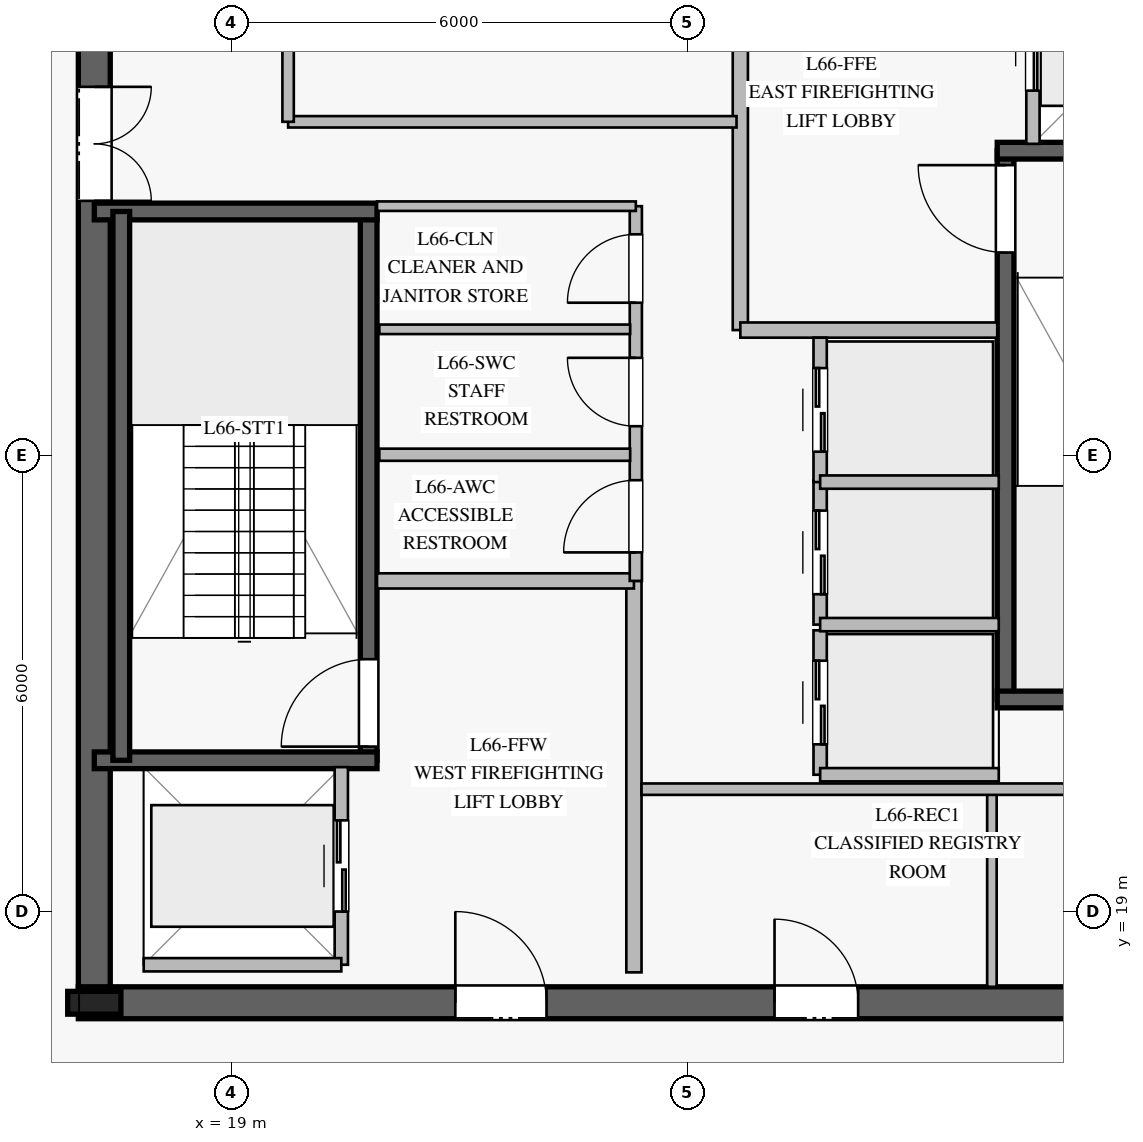
"""IFC4 building model, lengths in metres.
Left out: names, types, materials, properties, quantities, classifications, styles, units other than length and angle.
Written with IfcOpenShell. Run it as: python <this file> out.ifc"""

import sys

from ifc_helpers import new_model, si_unit, direction, frame, frame_2d, origin, origin_2d, place, context, subcontext, project, spatial, rectangle, i_section, extrude, element, fill, save


model = new_model("IFC4")
c1 = context("Model", 3, precision=1e-05, world=origin(), true_north=direction((0.0, 1.0)))
c2 = subcontext(c1, "Body", "Model", "MODEL_VIEW")
j1 = project(units=[si_unit("LENGTHUNIT", "METRE"), si_unit("PLANEANGLEUNIT", "RADIAN")], contexts=[c1])
p1 = place(None, origin())
s1 = spatial("IfcSite", under=j1, at=p1, CompositionType="ELEMENT")
p2 = place(p1, origin())
s2 = spatial("IfcBuilding", under=s1, at=p2, CompositionType="ELEMENT")
p3 = place(p2, frame((0.0, 0.0, 274.2)))
s3 = spatial("IfcBuildingStorey", under=s2, at=p3, CompositionType="ELEMENT", Elevation=274.2)
p4 = place(p3, frame((16.99, 17.8, 0.0), z_axis=(0.0, 0.0, 1.0), x_axis=(1.0, 0.0, 0.0)))
e1 = element("IfcWall", 1, at=p4, inside=s3, PredefinedType="SHEAR", context=c2, shape_type="SweptSolid", body=[
    extrude(rectangle(XDim=16.02, YDim=0.42, at=frame_2d((8.01, 0.0))), origin(), (0.0, 0.0, 1.0), 3.78),
])
p5 = place(p4, frame((4.96, 0.0, 0.0)))
e2 = element("IfcOpeningElement", 2, at=p5, cuts=e1, PredefinedType="OPENING", context=c2, shape_type="SweptSolid", body=[
    extrude(rectangle(XDim=1.2, YDim=2.25, at=frame_2d((0.6, 1.125))), frame((0.0, 0.22, 0.0), z_axis=(0.0, -1.0, 0.0), x_axis=(1.0, 0.0, 0.0)), (0.0, 0.0, 1.0), 0.44),
])
p6 = place(p4, frame((13.91, 0.0, 0.0)))
e3 = element("IfcOpeningElement", 3, at=p6, cuts=e1, PredefinedType="OPENING", context=c2, shape_type="SweptSolid", body=[
    extrude(rectangle(XDim=0.9, YDim=2.1, at=frame_2d((0.45, 1.05))), frame((0.0, 0.22, 0.0), z_axis=(0.0, -1.0, 0.0), x_axis=(1.0, 0.0, 0.0)), (0.0, 0.0, 1.0), 0.44),
])
p7 = place(p4, frame((9.16, 0.0, 0.0)))
e4 = element("IfcOpeningElement", 4, at=p7, cuts=e1, PredefinedType="OPENING", context=c2, shape_type="SweptSolid", body=[
    extrude(rectangle(XDim=1.1, YDim=2.2, at=frame_2d((0.55, 1.1))), frame((0.0, 0.22, 0.0), z_axis=(0.0, -1.0, 0.0), x_axis=(1.0, 0.0, 0.0)), (0.0, 0.0, 1.0), 0.44),
])
p8 = place(p3, frame((17.2, 31.99, 0.0), z_axis=(0.0, 0.0, 1.0), x_axis=(0.0, -1.0, 0.0)))
e5 = element("IfcWall", 5, at=p8, inside=s3, PredefinedType="SHEAR", context=c2, shape_type="SweptSolid", body=[
    extrude(rectangle(XDim=13.98, YDim=0.42, at=frame_2d((6.99, 0.0))), origin(), (0.0, 0.0, 1.0), 3.78),
])
p9 = place(p8, frame((2.14, 0.0, 0.0)))
e6 = element("IfcOpeningElement", 6, at=p9, cuts=e5, PredefinedType="OPENING", context=c2, shape_type="SweptSolid", body=[
    extrude(rectangle(XDim=1.5, YDim=2.2, at=frame_2d((0.75, 1.1))), frame((0.0, 0.22, 0.0), z_axis=(0.0, -1.0, 0.0), x_axis=(1.0, 0.0, 0.0)), (0.0, 0.0, 1.0), 0.44),
])
p10 = place(p3, frame((17.2, 17.8, 0.0), z_axis=(0.0, 0.0, 1.0), x_axis=(1.0, 0.0, 0.0)))
e7 = element("IfcColumn", 7, at=p10, inside=s3, PredefinedType="COLUMN", context=c2, shape_type="SweptSolid", body=[
    extrude(i_section(OverallWidth=0.3, OverallDepth=0.7, WebThickness=0.017, FlangeThickness=0.032, at=origin_2d()), origin(), (0.0, 0.0, 1.0), 4.0),
])
p11 = place(p3, frame((20.81, 20.99, 0.0), z_axis=(0.0, 0.0, 1.0), x_axis=(0.0, 1.0, 0.0)))
e8 = element("IfcWall", 8, at=p11, inside=s3, PredefinedType="SOLIDWALL", context=c2, shape_type="SweptSolid", body=[
    extrude(rectangle(XDim=7.22, YDim=0.22, at=frame_2d((3.61, 0.0))), origin(), (0.0, 0.0, 1.0), 3.78),
])
p12 = place(p11, frame((0.18, 0.0, 0.0)))
e9 = element("IfcOpeningElement", 9, at=p12, cuts=e8, PredefinedType="OPENING", context=c2, shape_type="SweptSolid", body=[
    extrude(rectangle(XDim=1.15, YDim=2.2, at=frame_2d((0.575, 1.1))), frame((0.0, 0.12, 0.0), z_axis=(0.0, -1.0, 0.0), x_axis=(1.0, 0.0, 0.0)), (0.0, 0.0, 1.0), 0.24),
])
for number, where, z_axis, x_axis in (
    (10, (17.2, 20.99, 0.0), (0.0, 0.0, 1.0), (1.0, 0.0, 0.0)),
    (11, (17.2, 28.21, 0.0), (0.0, 0.0, 1.0), (1.0, 0.0, 0.0)),
):
    element("IfcWall", number, at=place(p3, frame(where, z_axis=z_axis, x_axis=x_axis)), inside=s3, PredefinedType="SOLIDWALL", context=c2, shape_type="SweptSolid", body=[
        extrude(rectangle(XDim=3.72, YDim=0.22, at=frame_2d((1.86, 0.0))), origin(), (0.0, 0.0, 1.0), 3.78),
    ])
p13 = place(p3, frame((17.555, 28.21, 0.0), z_axis=(0.0, 0.0, 1.0), x_axis=(0.0, -1.0, 0.0)))
e12 = element("IfcWall", 12, at=p13, inside=s3, PredefinedType="SOLIDWALL", context=c2, shape_type="SweptSolid", body=[
    extrude(rectangle(XDim=7.22, YDim=0.22, at=frame_2d((3.61, 0.0))), origin(), (0.0, 0.0, 1.0), 3.78),
])
p14 = place(p3, frame((29.19, 21.79, 0.0), z_axis=(0.0, 0.0, 1.0), x_axis=(0.0, 1.0, 0.0)))
e13 = element("IfcWall", 13, at=p14, inside=s3, PredefinedType="SOLIDWALL", context=c2, shape_type="SweptSolid", body=[
    extrude(rectangle(XDim=7.22, YDim=0.22, at=frame_2d((3.61, 0.0))), origin(), (0.0, 0.0, 1.0), 3.78),
])
p15 = place(p14, frame((5.88, 0.0, 0.0)))
e14 = element("IfcOpeningElement", 14, at=p15, cuts=e13, PredefinedType="OPENING", context=c2, shape_type="SweptSolid", body=[
    extrude(rectangle(XDim=1.15, YDim=2.2, at=frame_2d((0.575, 1.1))), frame((0.0, 0.12, 0.0), z_axis=(0.0, -1.0, 0.0), x_axis=(1.0, 0.0, 0.0)), (0.0, 0.0, 1.0), 0.24),
])
for number, where, z_axis, x_axis in (
    (15, (29.08, 21.79, 0.0), (0.0, 0.0, 1.0), (1.0, 0.0, 0.0)),
    (16, (29.08, 29.01, 0.0), (0.0, 0.0, 1.0), (1.0, 0.0, 0.0)),
):
    element("IfcWall", number, at=place(p3, frame(where, z_axis=z_axis, x_axis=x_axis)), inside=s3, PredefinedType="SOLIDWALL", context=c2, shape_type="SweptSolid", body=[
        extrude(rectangle(XDim=3.72, YDim=0.22, at=frame_2d((1.86, 0.0))), origin(), (0.0, 0.0, 1.0), 3.78),
    ])
p16 = place(p3, frame((24.3, 18.2, 0.0), z_axis=(0.0, 0.0, 1.0), x_axis=(0.0, 1.0, 0.0)))
e17 = element("IfcWall", 17, at=p16, inside=s3, PredefinedType="PARTITIONING", context=c2, shape_type="SweptSolid", body=[
    extrude(rectangle(XDim=5.15, YDim=0.2, at=frame_2d((2.575, 0.0))), origin(), (0.0, 0.0, 1.0), 3.78),
])
p17 = place(p3, frame((20.92, 23.35, 0.0), z_axis=(0.0, 0.0, 1.0), x_axis=(1.0, 0.0, 0.0)))
e18 = element("IfcWall", 18, at=p17, inside=s3, PredefinedType="PARTITIONING", context=c2, shape_type="SweptSolid", body=[
    extrude(rectangle(XDim=3.38, YDim=0.2, at=frame_2d((1.69, 0.0))), origin(), (0.0, 0.0, 1.0), 3.78),
])
p18 = place(p3, frame((25.7, 26.65, 0.0), z_axis=(0.0, 0.0, 1.0), x_axis=(0.0, 1.0, 0.0)))
e19 = element("IfcWall", 19, at=p18, inside=s3, PredefinedType="PARTITIONING", context=c2, shape_type="SweptSolid", body=[
    extrude(rectangle(XDim=5.15, YDim=0.2, at=frame_2d((2.575, 0.0))), origin(), (0.0, 0.0, 1.0), 3.78),
])
p19 = place(p3, frame((25.7, 26.65, 0.0), z_axis=(0.0, 0.0, 1.0), x_axis=(1.0, 0.0, 0.0)))
e20 = element("IfcWall", 20, at=p19, inside=s3, PredefinedType="PARTITIONING", context=c2, shape_type="SweptSolid", body=[
    extrude(rectangle(XDim=3.38, YDim=0.2, at=frame_2d((1.69, 0.0))), origin(), (0.0, 0.0, 1.0), 3.78),
])
p20 = place(p3, frame((24.325, 23.35, 0.0), z_axis=(0.0, 0.0, 1.0), x_axis=(0.0, 1.0, 0.0)))
e21 = element("IfcWall", 21, at=p20, inside=s3, PredefinedType="PLUMBINGWALL", context=c2, shape_type="SweptSolid", body=[
    extrude(rectangle(XDim=4.93, YDim=0.16, at=frame_2d((2.465, 0.0))), origin(), (0.0, 0.0, 1.0), 3.78),
])
p21 = place(p20, frame((0.375, 0.0, 0.0)))
e22 = element("IfcOpeningElement", 22, at=p21, cuts=e21, PredefinedType="OPENING", context=c2, shape_type="SweptSolid", body=[
    extrude(rectangle(XDim=0.95, YDim=2.1, at=frame_2d((0.475, 1.05))), frame((0.0, 0.09, 0.0), z_axis=(0.0, -1.0, 0.0), x_axis=(1.0, 0.0, 0.0)), (0.0, 0.0, 1.0), 0.18),
])
p22 = place(p20, frame((2.035, 0.0, 0.0)))
e23 = element("IfcOpeningElement", 23, at=p22, cuts=e21, PredefinedType="OPENING", context=c2, shape_type="SweptSolid", body=[
    extrude(rectangle(XDim=0.9, YDim=2.1, at=frame_2d((0.45, 1.05))), frame((0.0, 0.09, 0.0), z_axis=(0.0, -1.0, 0.0), x_axis=(1.0, 0.0, 0.0)), (0.0, 0.0, 1.0), 0.18),
])
p23 = place(p20, frame((3.66, 0.0, 0.0)))
e24 = element("IfcOpeningElement", 24, at=p23, cuts=e21, PredefinedType="OPENING", context=c2, shape_type="SweptSolid", body=[
    extrude(rectangle(XDim=0.9, YDim=2.1, at=frame_2d((0.45, 1.05))), frame((0.0, 0.09, 0.0), z_axis=(0.0, -1.0, 0.0), x_axis=(1.0, 0.0, 0.0)), (0.0, 0.0, 1.0), 0.18),
])
p24 = place(p3, frame((20.92, 28.28, 0.0), z_axis=(0.0, 0.0, 1.0), x_axis=(1.0, 0.0, 0.0)))
e25 = element("IfcWall", 25, at=p24, inside=s3, PredefinedType="PARTITIONING", context=c2, shape_type="SweptSolid", body=[
    extrude(rectangle(XDim=3.405, YDim=0.125, at=frame_2d((1.703, 0.0))), origin(), (0.0, 0.0, 1.0), 3.78),
])
p25 = place(p3, frame((29.01, 18.01, 0.0), z_axis=(0.0, 0.0, 1.0), x_axis=(0.0, 1.0, 0.0)))
e26 = element("IfcWall", 26, at=p25, inside=s3, PredefinedType="PARTITIONING", context=c2, shape_type="SweptSolid", body=[
    extrude(rectangle(XDim=2.54, YDim=0.125, at=frame_2d((1.27, 0.0))), origin(), (0.0, 0.0, 1.0), 3.78),
])
p26 = place(p3, frame((20.95, 25.01, 0.0), z_axis=(0.0, 0.0, 1.0), x_axis=(1.0, 0.0, 0.0)))
e27 = element("IfcWall", 27, at=p26, inside=s3, PredefinedType="PLUMBINGWALL", context=c2, shape_type="SweptSolid", body=[
    extrude(rectangle(XDim=3.3, YDim=0.16, at=frame_2d((1.65, 0.0))), origin(), (0.0, 0.0, 1.0), 3.78),
])
p27 = place(p3, frame((20.95, 26.66, 0.0), z_axis=(0.0, 0.0, 1.0), x_axis=(1.0, 0.0, 0.0)))
e28 = element("IfcWall", 28, at=p27, inside=s3, PredefinedType="PARTITIONING", context=c2, shape_type="SweptSolid", body=[
    extrude(rectangle(XDim=3.3, YDim=0.125, at=frame_2d((1.65, 0.0))), origin(), (0.0, 0.0, 1.0), 3.78),
])
p28 = place(p3, frame((24.4, 20.61, 0.0), z_axis=(0.0, 0.0, 1.0), x_axis=(1.0, 0.0, 0.0)))
e29 = element("IfcWall", 29, at=p28, inside=s3, PredefinedType="PARTITIONING", context=c2, shape_type="SweptSolid", body=[
    extrude(rectangle(XDim=5.9, YDim=0.15, at=frame_2d((2.95, 0.0))), origin(), (0.0, 0.0, 1.0), 3.78),
])
p29 = place(p3, frame((19.75, 29.39, 0.0), z_axis=(0.0, 0.0, 1.0), x_axis=(1.0, 0.0, 0.0)))
e30 = element("IfcWall", 30, at=p29, inside=s3, PredefinedType="PARTITIONING", context=c2, shape_type="SweptSolid", body=[
    extrude(rectangle(XDim=5.9, YDim=0.15, at=frame_2d((2.95, 0.0))), origin(), (0.0, 0.0, 1.0), 3.78),
])
p30 = place(p3, frame((19.75, 29.39, 0.0), z_axis=(0.0, 0.0, 1.0), x_axis=(0.0, 1.0, 0.0)))
e31 = element("IfcWall", 31, at=p30, inside=s3, PredefinedType="PARTITIONING", context=c2, shape_type="SweptSolid", body=[
    extrude(rectangle(XDim=2.41, YDim=0.15, at=frame_2d((1.205, 0.0))), origin(), (0.0, 0.0, 1.0), 3.78),
])
p31 = place(p3, frame((26.75, 20.8, 0.0), z_axis=(0.0, 0.0, 1.0), x_axis=(0.0, 1.0, 0.0)))
e32 = element("IfcWall", 32, at=p31, inside=s3, PredefinedType="PARTITIONING", context=c2, shape_type="SweptSolid", body=[
    extrude(rectangle(XDim=1.9, YDim=0.175, at=frame_2d((0.95, 0.0))), origin(), (0.0, 0.0, 1.0), 3.78),
])
p32 = place(p31, frame((0.4, 0.0, 0.0)))
e33 = element("IfcOpeningElement", 33, at=p32, cuts=e32, PredefinedType="OPENING", context=c2, shape_type="SweptSolid", body=[
    extrude(rectangle(XDim=1.1, YDim=2.2, at=frame_2d((0.55, 1.1))), frame((0.0, 0.098, 0.0), z_axis=(0.0, -1.0, 0.0), x_axis=(1.0, 0.0, 0.0)), (0.0, 0.0, 1.0), 0.195),
])
p33 = place(p3, frame((26.75, 20.8, 0.0), z_axis=(0.0, 0.0, 1.0), x_axis=(1.0, 0.0, 0.0)))
e34 = element("IfcWall", 34, at=p33, inside=s3, PredefinedType="PARTITIONING", context=c2, shape_type="SweptSolid", body=[
    extrude(rectangle(XDim=2.35, YDim=0.175, at=frame_2d((1.175, 0.0))), origin(), (0.0, 0.0, 1.0), 3.78),
])
p34 = place(p3, frame((26.75, 22.775, 0.0), z_axis=(0.0, 0.0, 1.0), x_axis=(0.0, 1.0, 0.0)))
e35 = element("IfcWall", 35, at=p34, inside=s3, PredefinedType="PARTITIONING", context=c2, shape_type="SweptSolid", body=[
    extrude(rectangle(XDim=1.9, YDim=0.175, at=frame_2d((0.95, 0.0))), origin(), (0.0, 0.0, 1.0), 3.78),
])
p35 = place(p34, frame((0.4, 0.0, 0.0)))
e36 = element("IfcOpeningElement", 36, at=p35, cuts=e35, PredefinedType="OPENING", context=c2, shape_type="SweptSolid", body=[
    extrude(rectangle(XDim=1.1, YDim=2.2, at=frame_2d((0.55, 1.1))), frame((0.0, 0.098, 0.0), z_axis=(0.0, -1.0, 0.0), x_axis=(1.0, 0.0, 0.0)), (0.0, 0.0, 1.0), 0.195),
])
p36 = place(p3, frame((26.75, 22.775, 0.0), z_axis=(0.0, 0.0, 1.0), x_axis=(1.0, 0.0, 0.0)))
e37 = element("IfcWall", 37, at=p36, inside=s3, PredefinedType="PARTITIONING", context=c2, shape_type="SweptSolid", body=[
    extrude(rectangle(XDim=2.35, YDim=0.175, at=frame_2d((1.175, 0.0))), origin(), (0.0, 0.0, 1.0), 3.78),
])
p37 = place(p3, frame((26.75, 24.65, 0.0), z_axis=(0.0, 0.0, 1.0), x_axis=(0.0, 1.0, 0.0)))
e38 = element("IfcWall", 38, at=p37, inside=s3, PredefinedType="PARTITIONING", context=c2, shape_type="SweptSolid", body=[
    extrude(rectangle(XDim=1.9, YDim=0.175, at=frame_2d((0.95, 0.0))), origin(), (0.0, 0.0, 1.0), 3.78),
])
p38 = place(p37, frame((0.4, 0.0, 0.0)))
e39 = element("IfcOpeningElement", 39, at=p38, cuts=e38, PredefinedType="OPENING", context=c2, shape_type="SweptSolid", body=[
    extrude(rectangle(XDim=1.1, YDim=2.2, at=frame_2d((0.55, 1.1))), frame((0.0, 0.098, 0.0), z_axis=(0.0, -1.0, 0.0), x_axis=(1.0, 0.0, 0.0)), (0.0, 0.0, 1.0), 0.195),
])
p39 = place(p3, frame((26.75, 24.65, 0.0), z_axis=(0.0, 0.0, 1.0), x_axis=(1.0, 0.0, 0.0)))
e40 = element("IfcWall", 40, at=p39, inside=s3, PredefinedType="PARTITIONING", context=c2, shape_type="SweptSolid", body=[
    extrude(rectangle(XDim=2.35, YDim=0.175, at=frame_2d((1.175, 0.0))), origin(), (0.0, 0.0, 1.0), 3.78),
])
p40 = place(p3, frame((20.45, 18.3, 0.0), z_axis=(0.0, 0.0, 1.0), x_axis=(0.0, 1.0, 0.0)))
e41 = element("IfcWall", 41, at=p40, inside=s3, PredefinedType="PARTITIONING", context=c2, shape_type="SweptSolid", body=[
    extrude(rectangle(XDim=2.6, YDim=0.175, at=frame_2d((1.3, 0.0))), origin(), (0.0, 0.0, 1.0), 3.78),
])
p41 = place(p40, frame((0.7, 0.0, 0.0)))
e42 = element("IfcOpeningElement", 42, at=p41, cuts=e41, PredefinedType="OPENING", context=c2, shape_type="SweptSolid", body=[
    extrude(rectangle(XDim=1.2, YDim=2.2, at=frame_2d((0.6, 1.1))), frame((0.0, 0.098, 0.0), z_axis=(0.0, -1.0, 0.0), x_axis=(1.0, 0.0, 0.0)), (0.0, 0.0, 1.0), 0.195),
])
p42 = place(p3, frame((17.85, 18.3, 0.0), z_axis=(0.0, 0.0, 1.0), x_axis=(1.0, 0.0, 0.0)))
e43 = element("IfcWall", 43, at=p42, inside=s3, PredefinedType="PARTITIONING", context=c2, shape_type="SweptSolid", body=[
    extrude(rectangle(XDim=2.6, YDim=0.175, at=frame_2d((1.3, 0.0))), origin(), (0.0, 0.0, 1.0), 3.78),
])
p43 = place(p3, frame((29.55, 29.1, 0.0), z_axis=(0.0, 0.0, 1.0), x_axis=(0.0, 1.0, 0.0)))
e44 = element("IfcWall", 44, at=p43, inside=s3, PredefinedType="PARTITIONING", context=c2, shape_type="SweptSolid", body=[
    extrude(rectangle(XDim=2.6, YDim=0.175, at=frame_2d((1.3, 0.0))), origin(), (0.0, 0.0, 1.0), 3.78),
])
p44 = place(p43, frame((0.7, 0.0, 0.0)))
e45 = element("IfcOpeningElement", 45, at=p44, cuts=e44, PredefinedType="OPENING", context=c2, shape_type="SweptSolid", body=[
    extrude(rectangle(XDim=1.2, YDim=2.2, at=frame_2d((0.6, 1.1))), frame((0.0, 0.098, 0.0), z_axis=(0.0, -1.0, 0.0), x_axis=(1.0, 0.0, 0.0)), (0.0, 0.0, 1.0), 0.195),
])
p45 = place(p12, origin())
e46 = element("IfcDoor", 46, at=p45, inside=s3, OperationType="SINGLE_SWING_LEFT", PredefinedType="DOOR", context=c2, shape_type="SweptSolid", body=[
    extrude(rectangle(XDim=1.15, YDim=2.2, at=frame_2d((0.575, 1.1))), frame((0.0, 0.025, 0.0), z_axis=(0.0, -1.0, 0.0), x_axis=(1.0, 0.0, 0.0)), (0.0, 0.0, 1.0), 0.05),
])
fill(e9, e46)
p46 = place(p15, origin())
e47 = element("IfcDoor", 47, at=p46, inside=s3, OperationType="SINGLE_SWING_RIGHT", PredefinedType="DOOR", context=c2, shape_type="SweptSolid", body=[
    extrude(rectangle(XDim=1.15, YDim=2.2, at=frame_2d((0.575, 1.1))), frame((0.0, 0.025, 0.0), z_axis=(0.0, -1.0, 0.0), x_axis=(1.0, 0.0, 0.0)), (0.0, 0.0, 1.0), 0.05),
])
fill(e14, e47)
p47 = place(p5, origin())
e48 = element("IfcDoor", 48, at=p47, inside=s3, OperationType="SINGLE_SWING_LEFT", PredefinedType="DOOR", context=c2, shape_type="SweptSolid", body=[
    extrude(rectangle(XDim=1.2, YDim=2.25, at=frame_2d((0.6, 1.125))), frame((0.0, 0.025, 0.0), z_axis=(0.0, -1.0, 0.0), x_axis=(1.0, 0.0, 0.0)), (0.0, 0.0, 1.0), 0.05),
])
fill(e2, e48)
p48 = place(p9, origin())
e49 = element("IfcDoor", 49, at=p48, inside=s3, OperationType="DOUBLE_DOOR_SINGLE_SWING", PredefinedType="DOOR", context=c2, shape_type="SweptSolid", body=[
    extrude(rectangle(XDim=1.5, YDim=2.2, at=frame_2d((0.75, 1.1))), frame((0.0, 0.025, 0.0), z_axis=(0.0, -1.0, 0.0), x_axis=(1.0, 0.0, 0.0)), (0.0, 0.0, 1.0), 0.05),
])
fill(e6, e49)
p49 = place(p21, origin())
e50 = element("IfcDoor", 50, at=p49, inside=s3, OperationType="SINGLE_SWING_LEFT", PredefinedType="DOOR", context=c2, shape_type="SweptSolid", body=[
    extrude(rectangle(XDim=0.95, YDim=2.1, at=frame_2d((0.475, 1.05))), frame((0.0, 0.025, 0.0), z_axis=(0.0, -1.0, 0.0), x_axis=(1.0, 0.0, 0.0)), (0.0, 0.0, 1.0), 0.05),
])
fill(e22, e50)
p50 = place(p22, origin())
e51 = element("IfcDoor", 51, at=p50, inside=s3, OperationType="SINGLE_SWING_RIGHT", PredefinedType="DOOR", context=c2, shape_type="SweptSolid", body=[
    extrude(rectangle(XDim=0.9, YDim=2.1, at=frame_2d((0.45, 1.05))), frame((0.0, 0.025, 0.0), z_axis=(0.0, -1.0, 0.0), x_axis=(1.0, 0.0, 0.0)), (0.0, 0.0, 1.0), 0.05),
])
fill(e23, e51)
p51 = place(p23, origin())
e52 = element("IfcDoor", 52, at=p51, inside=s3, OperationType="SINGLE_SWING_LEFT", PredefinedType="DOOR", context=c2, shape_type="SweptSolid", body=[
    extrude(rectangle(XDim=0.9, YDim=2.1, at=frame_2d((0.45, 1.05))), frame((0.0, 0.025, 0.0), z_axis=(0.0, -1.0, 0.0), x_axis=(1.0, 0.0, 0.0)), (0.0, 0.0, 1.0), 0.05),
])
fill(e24, e52)
p52 = place(p7, origin())
e53 = element("IfcDoor", 53, at=p52, inside=s3, OperationType="SINGLE_SWING_LEFT", PredefinedType="DOOR", context=c2, shape_type="SweptSolid", body=[
    extrude(rectangle(XDim=1.1, YDim=2.2, at=frame_2d((0.55, 1.1))), frame((0.0, 0.025, 0.0), z_axis=(0.0, -1.0, 0.0), x_axis=(1.0, 0.0, 0.0)), (0.0, 0.0, 1.0), 0.05),
])
fill(e4, e53)
p53 = place(p32, origin())
e54 = element("IfcDoor", 54, at=p53, inside=s3, OperationType="DOUBLE_DOOR_SLIDING", PredefinedType="DOOR", context=c2, shape_type="SweptSolid", body=[
    extrude(rectangle(XDim=1.1, YDim=2.2, at=frame_2d((0.55, 1.1))), frame((0.0, 0.025, 0.0), z_axis=(0.0, -1.0, 0.0), x_axis=(1.0, 0.0, 0.0)), (0.0, 0.0, 1.0), 0.05),
])
fill(e33, e54)
p54 = place(p35, origin())
e55 = element("IfcDoor", 55, at=p54, inside=s3, OperationType="DOUBLE_DOOR_SLIDING", PredefinedType="DOOR", context=c2, shape_type="SweptSolid", body=[
    extrude(rectangle(XDim=1.1, YDim=2.2, at=frame_2d((0.55, 1.1))), frame((0.0, 0.025, 0.0), z_axis=(0.0, -1.0, 0.0), x_axis=(1.0, 0.0, 0.0)), (0.0, 0.0, 1.0), 0.05),
])
fill(e36, e55)
p55 = place(p38, origin())
e56 = element("IfcDoor", 56, at=p55, inside=s3, OperationType="DOUBLE_DOOR_SLIDING", PredefinedType="DOOR", context=c2, shape_type="SweptSolid", body=[
    extrude(rectangle(XDim=1.1, YDim=2.2, at=frame_2d((0.55, 1.1))), frame((0.0, 0.025, 0.0), z_axis=(0.0, -1.0, 0.0), x_axis=(1.0, 0.0, 0.0)), (0.0, 0.0, 1.0), 0.05),
])
fill(e39, e56)
p56 = place(p41, origin())
e57 = element("IfcDoor", 57, at=p56, inside=s3, OperationType="DOUBLE_DOOR_SLIDING", PredefinedType="DOOR", context=c2, shape_type="SweptSolid", body=[
    extrude(rectangle(XDim=1.2, YDim=2.2, at=frame_2d((0.6, 1.1))), frame((0.0, 0.025, 0.0), z_axis=(0.0, -1.0, 0.0), x_axis=(1.0, 0.0, 0.0)), (0.0, 0.0, 1.0), 0.05),
])
fill(e42, e57)
p57 = place(p44, origin())
e58 = element("IfcDoor", 58, at=p57, inside=s3, OperationType="DOUBLE_DOOR_SLIDING", PredefinedType="DOOR", context=c2, shape_type="SweptSolid", body=[
    extrude(rectangle(XDim=1.2, YDim=2.2, at=frame_2d((0.6, 1.1))), frame((0.0, 0.025, 0.0), z_axis=(0.0, -1.0, 0.0), x_axis=(1.0, 0.0, 0.0)), (0.0, 0.0, 1.0), 0.05),
])
fill(e45, e58)
save(model, sys.argv[1])
